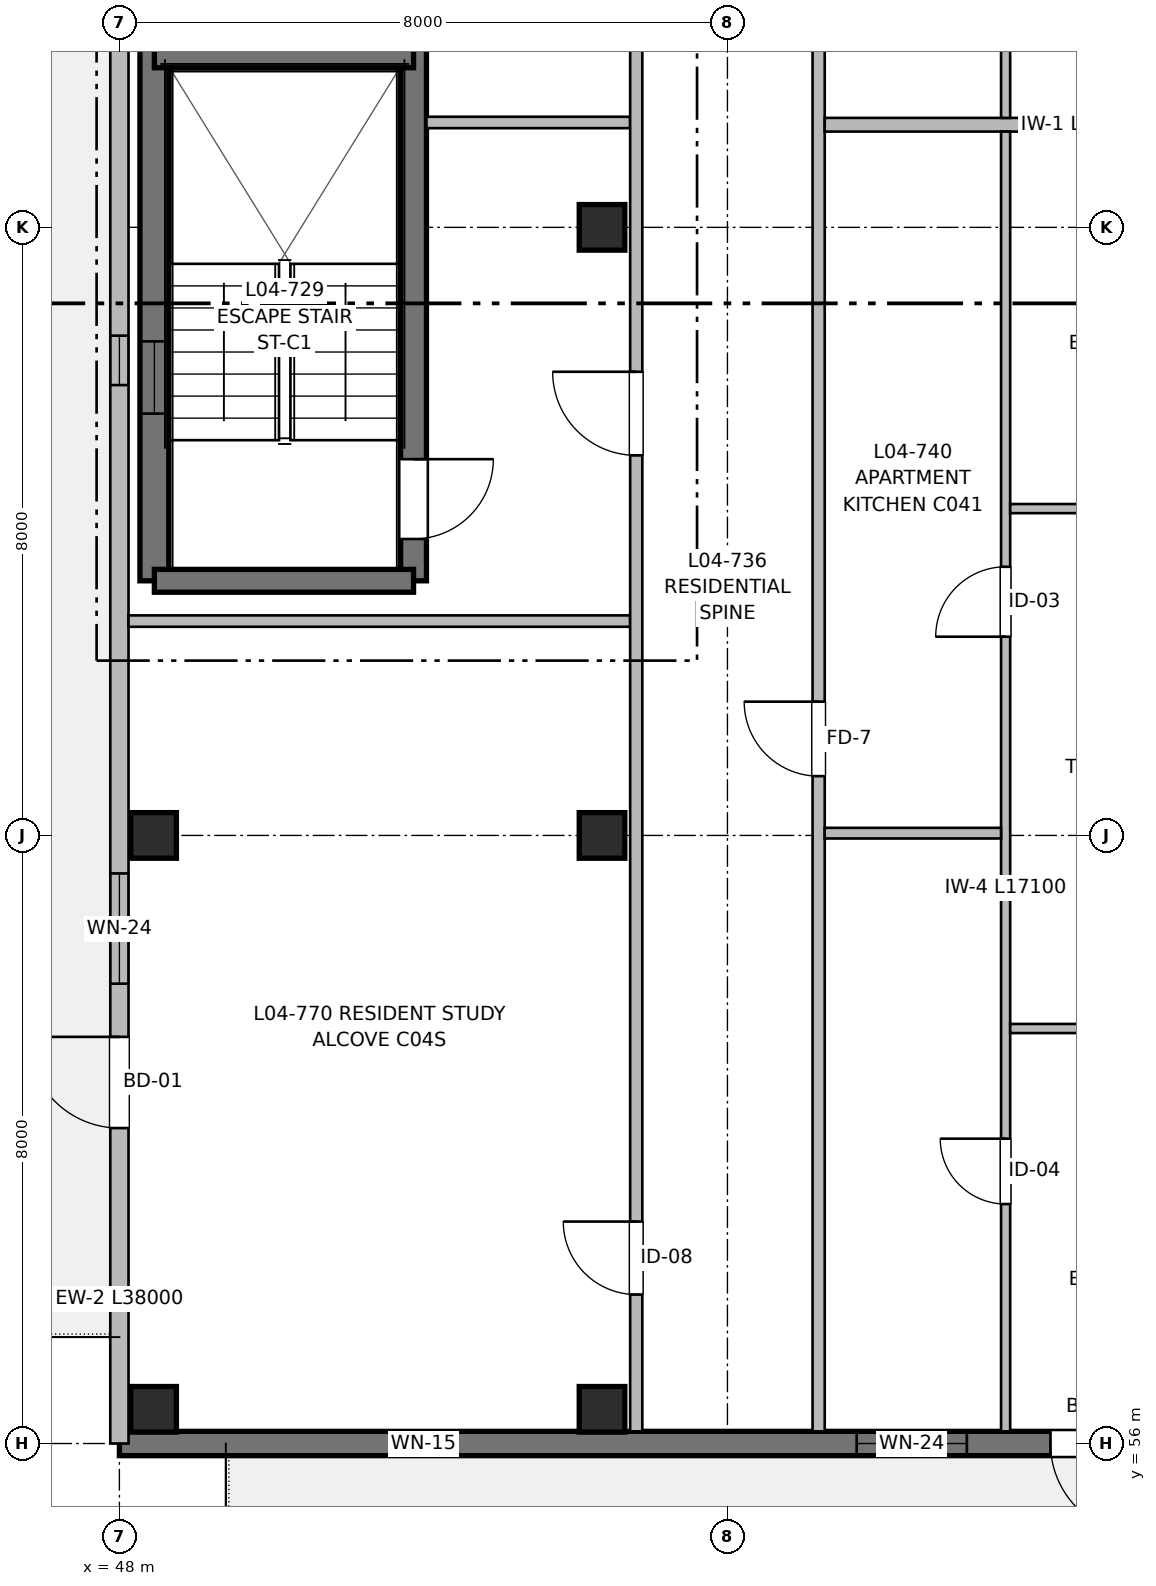
"""IFC4 building model, lengths in metres.
Left out: names, types, materials, properties, quantities, classifications, styles, units other than length and angle.
Written with IfcOpenShell. Run it as: python <this file> out.ifc"""

import sys

from ifc_helpers import new_model, si_unit, direction, frame, frame_2d, origin, origin_2d, place, context, subcontext, project, spatial, rectangle, extrude, element, fill, save


model = new_model("IFC4")
c1 = context("Model", 3, precision=1e-05, world=origin(), true_north=direction((0.0, 1.0)))
c2 = subcontext(c1, "Body", "Model", "MODEL_VIEW")
j1 = project(units=[si_unit("LENGTHUNIT", "METRE"), si_unit("PLANEANGLEUNIT", "RADIAN")], contexts=[c1])
p1 = place(None, origin())
s1 = spatial("IfcSite", under=j1, at=p1, CompositionType="ELEMENT")
p2 = place(p1, origin())
s2 = spatial("IfcBuilding", under=s1, at=p2, CompositionType="ELEMENT")
p3 = place(p2, frame((0.0, 0.0, 13.76)))
s3 = spatial("IfcBuildingStorey", under=s2, at=p3, CompositionType="ELEMENT", Elevation=13.76)
for number, where, z_axis, x_axis in (
    (1, (48.45, 56.45, 0.0), (0.0, 0.0, 1.0), (1.0, 0.0, 0.0)),
    (2, (48.45, 64.0, 0.0), (0.0, 0.0, 1.0), (1.0, 0.0, 0.0)),
    (3, (54.35, 56.45, 0.0), (0.0, 0.0, 1.0), (1.0, 0.0, 0.0)),
    (4, (54.35, 64.0, 0.0), (0.0, 0.0, 1.0), (1.0, 0.0, 0.0)),
    (5, (54.35, 72.0, 0.0), (0.0, 0.0, 1.0), (1.0, 0.0, 0.0)),
):
    element("IfcColumn", number, at=place(p3, frame(where, z_axis=z_axis, x_axis=x_axis)), inside=s3, PredefinedType="COLUMN", context=c2, shape_type="SweptSolid", body=[
        extrude(rectangle(XDim=0.6, YDim=0.6, at=origin_2d()), origin(), (0.0, 0.0, 1.0), 3.2),
    ])
p4 = place(p3, frame((48.46, 67.35, 0.0), z_axis=(0.0, 0.0, 1.0), x_axis=(0.0, 1.0, 0.0)))
e6 = element("IfcWall", 6, at=p4, inside=s3, PredefinedType="SHEAR", context=c2, shape_type="SweptSolid", body=[
    extrude(rectangle(XDim=12.45, YDim=0.38, at=frame_2d((6.225, 0.0))), origin(), (0.0, 0.0, 1.0), 3.2),
])
p5 = place(p4, frame((2.2, 0.0, 0.97)))
e7 = element("IfcOpeningElement", 7, at=p5, cuts=e6, PredefinedType="OPENING", context=c2, shape_type="SweptSolid", body=[
    extrude(rectangle(XDim=0.95, YDim=1.25, at=frame_2d((0.475, 0.625))), frame((0.0, 0.2, 0.0), z_axis=(0.0, -1.0, 0.0), x_axis=(1.0, 0.0, 0.0)), (0.0, 0.0, 1.0), 0.4),
])
p6 = place(p3, frame((51.87, 79.8, 0.0), z_axis=(0.0, 0.0, 1.0), x_axis=(0.0, -1.0, 0.0)))
e8 = element("IfcWall", 8, at=p6, inside=s3, PredefinedType="SHEAR", context=c2, shape_type="SweptSolid", body=[
    extrude(rectangle(XDim=12.45, YDim=0.34, at=frame_2d((6.225, 0.0))), origin(), (0.0, 0.0, 1.0), 3.2),
])
p7 = place(p6, frame((10.85, 0.0, 0.0)))
e9 = element("IfcOpeningElement", 9, at=p7, cuts=e8, PredefinedType="OPENING", context=c2, shape_type="SweptSolid", body=[
    extrude(rectangle(XDim=1.05, YDim=2.15, at=frame_2d((0.525, 1.075))), frame((0.0, 0.18, 0.0), z_axis=(0.0, -1.0, 0.0), x_axis=(1.0, 0.0, 0.0)), (0.0, 0.0, 1.0), 0.36),
])
p8 = place(p3, frame((51.87, 67.35, 0.0), z_axis=(0.0, 0.0, 1.0), x_axis=(-1.0, 0.0, 0.0)))
e10 = element("IfcWall", 10, at=p8, inside=s3, PredefinedType="SHEAR", context=c2, shape_type="SweptSolid", body=[
    extrude(rectangle(XDim=3.41, YDim=0.3, at=frame_2d((1.705, 0.0))), origin(), (0.0, 0.0, 1.0), 3.2),
])
p9 = place(p3, frame((48.46, 74.24, 0.0), z_axis=(0.0, 0.0, 1.0), x_axis=(1.0, 0.0, 0.0)))
e11 = element("IfcWall", 11, at=p9, inside=s3, PredefinedType="SHEAR", context=c2, shape_type="SweptSolid", body=[
    extrude(rectangle(XDim=3.41, YDim=0.28, at=frame_2d((1.705, 0.0))), origin(), (0.0, 0.0, 1.0), 3.2),
])
p10 = place(p3, frame((64.0, 56.0, 0.0), z_axis=(0.0, 0.0, 1.0), x_axis=(-1.0, 0.0, 0.0)))
e12 = element("IfcWall", 12, at=p10, inside=s3, PredefinedType="SHEAR", context=c2, shape_type="SweptSolid", body=[
    extrude(rectangle(XDim=16.0, YDim=0.32, at=frame_2d((8.0, 0.0))), origin(), (0.0, 0.0, 1.0), 2.98),
])
p11 = place(p10, frame((2.55, 0.0, 0.0)))
e13 = element("IfcOpeningElement", 13, at=p11, cuts=e12, PredefinedType="OPENING", context=c2, shape_type="SweptSolid", body=[
    extrude(rectangle(XDim=1.2, YDim=2.2, at=frame_2d((0.6, 1.1))), frame((0.0, 0.17, 0.0), z_axis=(0.0, -1.0, 0.0), x_axis=(1.0, 0.0, 0.0)), (0.0, 0.0, 1.0), 0.34),
])
p12 = place(p10, frame((4.85, 0.0, 0.77)))
e14 = element("IfcOpeningElement", 14, at=p12, cuts=e12, PredefinedType="OPENING", context=c2, shape_type="SweptSolid", body=[
    extrude(rectangle(XDim=1.45, YDim=1.45, at=frame_2d((0.725, 0.725))), frame((0.0, 0.17, 0.0), z_axis=(0.0, -1.0, 0.0), x_axis=(1.0, 0.0, 0.0)), (0.0, 0.0, 1.0), 0.34),
])
p13 = place(p10, frame((11.675, 0.0, 0.9)))
e15 = element("IfcOpeningElement", 15, at=p13, cuts=e12, PredefinedType="OPENING", context=c2, shape_type="SweptSolid", body=[
    extrude(rectangle(XDim=0.65, YDim=0.95, at=frame_2d((0.325, 0.475))), frame((0.0, 0.17, 0.0), z_axis=(0.0, -1.0, 0.0), x_axis=(1.0, 0.0, 0.0)), (0.0, 0.0, 1.0), 0.34),
])
p14 = place(p3, frame((48.0, 56.0, 0.0), z_axis=(0.0, 0.0, 1.0), x_axis=(0.0, 1.0, 0.0)))
e16 = element("IfcWall", 16, at=p14, inside=s3, PredefinedType="SOLIDWALL", context=c2, shape_type="SweptSolid", body=[
    extrude(rectangle(XDim=38.0, YDim=0.24, at=frame_2d((19.0, 0.0))), origin(), (0.0, 0.0, 1.0), 2.98),
])
p15 = place(p14, frame((4.15, 0.0, 0.0)))
e17 = element("IfcOpeningElement", 17, at=p15, cuts=e16, PredefinedType="OPENING", context=c2, shape_type="SweptSolid", body=[
    extrude(rectangle(XDim=1.2, YDim=2.2, at=frame_2d((0.6, 1.1))), frame((0.0, 0.13, 0.0), z_axis=(0.0, -1.0, 0.0), x_axis=(1.0, 0.0, 0.0)), (0.0, 0.0, 1.0), 0.26),
])
p16 = place(p14, frame((6.05, 0.0, 0.77)))
e18 = element("IfcOpeningElement", 18, at=p16, cuts=e16, PredefinedType="OPENING", context=c2, shape_type="SweptSolid", body=[
    extrude(rectangle(XDim=1.45, YDim=1.45, at=frame_2d((0.725, 0.725))), frame((0.0, 0.13, 0.0), z_axis=(0.0, -1.0, 0.0), x_axis=(1.0, 0.0, 0.0)), (0.0, 0.0, 1.0), 0.26),
])
p17 = place(p14, frame((13.925, 0.0, 0.9)))
e19 = element("IfcOpeningElement", 19, at=p17, cuts=e16, PredefinedType="OPENING", context=c2, shape_type="SweptSolid", body=[
    extrude(rectangle(XDim=0.65, YDim=0.95, at=frame_2d((0.325, 0.475))), frame((0.0, 0.13, 0.0), z_axis=(0.0, -1.0, 0.0), x_axis=(1.0, 0.0, 0.0)), (0.0, 0.0, 1.0), 0.26),
])
p18 = place(p14, frame((24.05, 0.0, 0.62)))
e20 = element("IfcOpeningElement", 20, at=p18, cuts=e16, PredefinedType="OPENING", context=c2, shape_type="SweptSolid", body=[
    extrude(rectangle(XDim=1.1, YDim=1.6, at=frame_2d((0.55, 0.8))), frame((0.0, 0.13, 0.0), z_axis=(0.0, -1.0, 0.0), x_axis=(1.0, 0.0, 0.0)), (0.0, 0.0, 1.0), 0.26),
])
p19 = place(p14, frame((31.9, 0.0, 0.47)))
e21 = element("IfcOpeningElement", 21, at=p19, cuts=e16, PredefinedType="OPENING", context=c2, shape_type="SweptSolid", body=[
    extrude(rectangle(XDim=2.7, YDim=1.75, at=frame_2d((1.35, 0.875))), frame((0.0, 0.13, 0.0), z_axis=(0.0, -1.0, 0.0), x_axis=(1.0, 0.0, 0.0)), (0.0, 0.0, 1.0), 0.26),
])
p20 = place(p3, frame((48.12, 66.82, 0.0), z_axis=(0.0, 0.0, 1.0), x_axis=(1.0, 0.0, 0.0)))
e22 = element("IfcWall", 22, at=p20, inside=s3, PredefinedType="PARTITIONING", context=c2, shape_type="SweptSolid", body=[
    extrude(rectangle(XDim=6.6, YDim=0.15, at=frame_2d((3.3, 0.0))), origin(), (0.0, 0.0, 1.0), 2.935),
])
p21 = place(p3, frame((52.04, 73.38, 0.0), z_axis=(0.0, 0.0, 1.0), x_axis=(1.0, 0.0, 0.0)))
e23 = element("IfcWall", 23, at=p21, inside=s3, PredefinedType="PARTITIONING", context=c2, shape_type="SweptSolid", body=[
    extrude(rectangle(XDim=2.68, YDim=0.15, at=frame_2d((1.34, 0.0))), origin(), (0.0, 0.0, 1.0), 2.935),
])
p22 = place(p3, frame((54.8, 56.16, 0.0), z_axis=(0.0, 0.0, 1.0), x_axis=(0.0, 1.0, 0.0)))
e24 = element("IfcWall", 24, at=p22, inside=s3, PredefinedType="PARTITIONING", context=c2, shape_type="SweptSolid", body=[
    extrude(rectangle(XDim=50.64, YDim=0.16, at=frame_2d((25.32, 0.0))), origin(), (0.0, 0.0, 1.0), 2.935),
])
p23 = place(p22, frame((12.84, 0.0, 0.0)))
e25 = element("IfcOpeningElement", 25, at=p23, cuts=e24, PredefinedType="OPENING", context=c2, shape_type="SweptSolid", body=[
    extrude(rectangle(XDim=1.1, YDim=2.15, at=frame_2d((0.55, 1.075))), frame((0.0, 0.09, 0.0), z_axis=(0.0, -1.0, 0.0), x_axis=(1.0, 0.0, 0.0)), (0.0, 0.0, 1.0), 0.18),
])
p24 = place(p22, frame((19.24, 0.0, 0.0)))
e26 = element("IfcOpeningElement", 26, at=p24, cuts=e24, PredefinedType="OPENING", context=c2, shape_type="SweptSolid", body=[
    extrude(rectangle(XDim=1.6, YDim=2.15, at=frame_2d((0.8, 1.075))), frame((0.0, 0.09, 0.0), z_axis=(0.0, -1.0, 0.0), x_axis=(1.0, 0.0, 0.0)), (0.0, 0.0, 1.0), 0.18),
])
p25 = place(p22, frame((1.8, 0.0, 0.0)))
e27 = element("IfcOpeningElement", 27, at=p25, cuts=e24, PredefinedType="OPENING", context=c2, shape_type="SweptSolid", body=[
    extrude(rectangle(XDim=0.96, YDim=2.15, at=frame_2d((0.48, 1.075))), frame((0.0, 0.09, 0.0), z_axis=(0.0, -1.0, 0.0), x_axis=(1.0, 0.0, 0.0)), (0.0, 0.0, 1.0), 0.18),
])
p26 = place(p22, frame((32.745, 0.0, 0.0)))
e28 = element("IfcOpeningElement", 28, at=p26, cuts=e24, PredefinedType="OPENING", context=c2, shape_type="SweptSolid", body=[
    extrude(rectangle(XDim=0.98, YDim=2.15, at=frame_2d((0.49, 1.075))), frame((0.0, 0.09, 0.0), z_axis=(0.0, -1.0, 0.0), x_axis=(1.0, 0.0, 0.0)), (0.0, 0.0, 1.0), 0.18),
])
p27 = place(p22, frame((40.955, 0.0, 0.0)))
e29 = element("IfcOpeningElement", 29, at=p27, cuts=e24, PredefinedType="OPENING", context=c2, shape_type="SweptSolid", body=[
    extrude(rectangle(XDim=0.98, YDim=2.15, at=frame_2d((0.49, 1.075))), frame((0.0, 0.09, 0.0), z_axis=(0.0, -1.0, 0.0), x_axis=(1.0, 0.0, 0.0)), (0.0, 0.0, 1.0), 0.18),
])
p28 = place(p3, frame((57.2, 56.16, 0.0), z_axis=(0.0, 0.0, 1.0), x_axis=(0.0, 1.0, 0.0)))
e30 = element("IfcWall", 30, at=p28, inside=s3, PredefinedType="PARTITIONING", context=c2, shape_type="SweptSolid", body=[
    extrude(rectangle(XDim=50.64, YDim=0.16, at=frame_2d((25.32, 0.0))), origin(), (0.0, 0.0, 1.0), 2.935),
])
p29 = place(p28, frame((8.62, 0.0, 0.0)))
e31 = element("IfcOpeningElement", 31, at=p29, cuts=e30, PredefinedType="OPENING", context=c2, shape_type="SweptSolid", body=[
    extrude(rectangle(XDim=0.98, YDim=2.15, at=frame_2d((0.49, 1.075))), frame((0.0, 0.09, 0.0), z_axis=(0.0, -1.0, 0.0), x_axis=(1.0, 0.0, 0.0)), (0.0, 0.0, 1.0), 0.18),
])
p30 = place(p28, frame((25.85, 0.0, 0.0)))
e32 = element("IfcOpeningElement", 32, at=p30, cuts=e30, PredefinedType="OPENING", context=c2, shape_type="SweptSolid", body=[
    extrude(rectangle(XDim=0.98, YDim=2.15, at=frame_2d((0.49, 1.075))), frame((0.0, 0.09, 0.0), z_axis=(0.0, -1.0, 0.0), x_axis=(1.0, 0.0, 0.0)), (0.0, 0.0, 1.0), 0.18),
])
p31 = place(p28, frame((42.62, 0.0, 0.0)))
e33 = element("IfcOpeningElement", 33, at=p31, cuts=e30, PredefinedType="OPENING", context=c2, shape_type="SweptSolid", body=[
    extrude(rectangle(XDim=0.98, YDim=2.15, at=frame_2d((0.49, 1.075))), frame((0.0, 0.09, 0.0), z_axis=(0.0, -1.0, 0.0), x_axis=(1.0, 0.0, 0.0)), (0.0, 0.0, 1.0), 0.18),
])
p32 = place(p3, frame((57.28, 73.35, 0.0), z_axis=(0.0, 0.0, 1.0), x_axis=(1.0, 0.0, 0.0)))
e34 = element("IfcWall", 34, at=p32, inside=s3, PredefinedType="PARTITIONING", context=c2, shape_type="SweptSolid", body=[
    extrude(rectangle(XDim=6.6, YDim=0.18, at=frame_2d((3.3, 0.0))), origin(), (0.0, 0.0, 1.0), 2.935),
])
p33 = place(p3, frame((59.66, 56.16, 0.0), z_axis=(0.0, 0.0, 1.0), x_axis=(0.0, 1.0, 0.0)))
e35 = element("IfcWall", 35, at=p33, inside=s3, PredefinedType="PARTITIONING", context=c2, shape_type="SweptSolid", body=[
    extrude(rectangle(XDim=17.1, YDim=0.12, at=frame_2d((8.55, 0.0))), origin(), (0.0, 0.0, 1.0), 2.935),
])
p34 = place(p33, frame((2.99, 0.0, 0.0)))
e36 = element("IfcOpeningElement", 36, at=p34, cuts=e35, PredefinedType="OPENING", context=c2, shape_type="SweptSolid", body=[
    extrude(rectangle(XDim=0.86, YDim=2.1, at=frame_2d((0.43, 1.05))), frame((0.0, 0.07, 0.0), z_axis=(0.0, -1.0, 0.0), x_axis=(1.0, 0.0, 0.0)), (0.0, 0.0, 1.0), 0.14),
])
p35 = place(p33, frame((10.454, 0.0, 0.0)))
e37 = element("IfcOpeningElement", 37, at=p35, cuts=e35, PredefinedType="OPENING", context=c2, shape_type="SweptSolid", body=[
    extrude(rectangle(XDim=0.92, YDim=2.1, at=frame_2d((0.46, 1.05))), frame((0.0, 0.07, 0.0), z_axis=(0.0, -1.0, 0.0), x_axis=(1.0, 0.0, 0.0)), (0.0, 0.0, 1.0), 0.14),
])
p36 = place(p3, frame((57.28, 64.03, 0.0), z_axis=(0.0, 0.0, 1.0), x_axis=(1.0, 0.0, 0.0)))
e38 = element("IfcWall", 38, at=p36, inside=s3, PredefinedType="PARTITIONING", context=c2, shape_type="SweptSolid", body=[
    extrude(rectangle(XDim=2.32, YDim=0.14, at=frame_2d((1.16, 0.0))), origin(), (0.0, 0.0, 1.0), 2.53),
])
p37 = place(p3, frame((59.72, 61.46, 0.0), z_axis=(0.0, 0.0, 1.0), x_axis=(1.0, 0.0, 0.0)))
e39 = element("IfcWall", 39, at=p37, inside=s3, PredefinedType="PARTITIONING", context=c2, shape_type="SweptSolid", body=[
    extrude(rectangle(XDim=4.16, YDim=0.12, at=frame_2d((2.08, 0.0))), origin(), (0.0, 0.0, 1.0), 2.935),
])
p38 = place(p37, frame((1.63, 0.0, 0.0)))
e40 = element("IfcOpeningElement", 40, at=p38, cuts=e39, PredefinedType="OPENING", context=c2, shape_type="SweptSolid", body=[
    extrude(rectangle(XDim=0.9, YDim=2.1, at=frame_2d((0.45, 1.05))), frame((0.0, 0.07, 0.0), z_axis=(0.0, -1.0, 0.0), x_axis=(1.0, 0.0, 0.0)), (0.0, 0.0, 1.0), 0.14),
])
p39 = place(p3, frame((59.72, 68.3, 0.0), z_axis=(0.0, 0.0, 1.0), x_axis=(1.0, 0.0, 0.0)))
e41 = element("IfcWall", 41, at=p39, inside=s3, PredefinedType="PARTITIONING", context=c2, shape_type="SweptSolid", body=[
    extrude(rectangle(XDim=4.16, YDim=0.12, at=frame_2d((2.08, 0.0))), origin(), (0.0, 0.0, 1.0), 2.935),
])
p40 = place(p39, frame((1.64, 0.0, 0.0)))
e42 = element("IfcOpeningElement", 42, at=p40, cuts=e41, PredefinedType="OPENING", context=c2, shape_type="SweptSolid", body=[
    extrude(rectangle(XDim=0.88, YDim=2.1, at=frame_2d((0.44, 1.05))), frame((0.0, 0.07, 0.0), z_axis=(0.0, -1.0, 0.0), x_axis=(1.0, 0.0, 0.0)), (0.0, 0.0, 1.0), 0.14),
])
p41 = place(p3, frame((59.66, 73.44, 0.0), z_axis=(0.0, 0.0, 1.0), x_axis=(0.0, 1.0, 0.0)))
e43 = element("IfcWall", 43, at=p41, inside=s3, PredefinedType="PARTITIONING", context=c2, shape_type="SweptSolid", body=[
    extrude(rectangle(XDim=17.01, YDim=0.12, at=frame_2d((8.505, 0.0))), origin(), (0.0, 0.0, 1.0), 2.935),
])
p42 = place(p41, frame((2.972, 0.0, 0.0)))
e44 = element("IfcOpeningElement", 44, at=p42, cuts=e43, PredefinedType="OPENING", context=c2, shape_type="SweptSolid", body=[
    extrude(rectangle(XDim=0.86, YDim=2.1, at=frame_2d((0.43, 1.05))), frame((0.0, 0.07, 0.0), z_axis=(0.0, -1.0, 0.0), x_axis=(1.0, 0.0, 0.0)), (0.0, 0.0, 1.0), 0.14),
])
p43 = place(p41, frame((10.393, 0.0, 0.0)))
e45 = element("IfcOpeningElement", 45, at=p43, cuts=e43, PredefinedType="OPENING", context=c2, shape_type="SweptSolid", body=[
    extrude(rectangle(XDim=0.92, YDim=2.1, at=frame_2d((0.46, 1.05))), frame((0.0, 0.07, 0.0), z_axis=(0.0, -1.0, 0.0), x_axis=(1.0, 0.0, 0.0)), (0.0, 0.0, 1.0), 0.14),
])
p44 = place(p7, origin())
e46 = element("IfcDoor", 46, at=p44, inside=s3, OperationType="SINGLE_SWING_LEFT", PredefinedType="DOOR", context=c2, shape_type="SweptSolid", body=[
    extrude(rectangle(XDim=1.05, YDim=2.15, at=frame_2d((0.525, 1.075))), frame((0.0, 0.025, 0.0), z_axis=(0.0, -1.0, 0.0), x_axis=(1.0, 0.0, 0.0)), (0.0, 0.0, 1.0), 0.05),
])
fill(e9, e46)
p45 = place(p5, origin())
e47 = element("IfcWindow", 47, at=p45, inside=s3, PartitioningType="SINGLE_PANEL", PredefinedType="WINDOW", context=c2, shape_type="SweptSolid", body=[
    extrude(rectangle(XDim=0.95, YDim=1.25, at=frame_2d((0.475, 0.625))), frame((0.0, 0.03, 0.0), z_axis=(0.0, -1.0, 0.0), x_axis=(1.0, 0.0, 0.0)), (0.0, 0.0, 1.0), 0.06),
])
fill(e7, e47)
p46 = place(p11, origin())
e48 = element("IfcDoor", 48, at=p46, inside=s3, OperationType="SINGLE_SWING_LEFT", PredefinedType="DOOR", context=c2, shape_type="SweptSolid", body=[
    extrude(rectangle(XDim=1.2, YDim=2.2, at=frame_2d((0.6, 1.1))), frame((0.0, 0.025, 0.0), z_axis=(0.0, -1.0, 0.0), x_axis=(1.0, 0.0, 0.0)), (0.0, 0.0, 1.0), 0.05),
])
fill(e13, e48)
p47 = place(p12, origin())
e49 = element("IfcWindow", 49, at=p47, inside=s3, PartitioningType="SINGLE_PANEL", PredefinedType="WINDOW", context=c2, shape_type="SweptSolid", body=[
    extrude(rectangle(XDim=1.45, YDim=1.45, at=frame_2d((0.725, 0.725))), frame((0.0, 0.03, 0.0), z_axis=(0.0, -1.0, 0.0), x_axis=(1.0, 0.0, 0.0)), (0.0, 0.0, 1.0), 0.06),
])
fill(e14, e49)
p48 = place(p13, origin())
e50 = element("IfcWindow", 50, at=p48, inside=s3, PartitioningType="SINGLE_PANEL", PredefinedType="WINDOW", context=c2, shape_type="SweptSolid", body=[
    extrude(rectangle(XDim=0.65, YDim=0.95, at=frame_2d((0.325, 0.475))), frame((0.0, 0.03, 0.0), z_axis=(0.0, -1.0, 0.0), x_axis=(1.0, 0.0, 0.0)), (0.0, 0.0, 1.0), 0.06),
])
fill(e15, e50)
p49 = place(p15, origin())
e51 = element("IfcDoor", 51, at=p49, inside=s3, OperationType="SINGLE_SWING_RIGHT", PredefinedType="DOOR", context=c2, shape_type="SweptSolid", body=[
    extrude(rectangle(XDim=1.2, YDim=2.2, at=frame_2d((0.6, 1.1))), frame((0.0, 0.025, 0.0), z_axis=(0.0, -1.0, 0.0), x_axis=(1.0, 0.0, 0.0)), (0.0, 0.0, 1.0), 0.05),
])
fill(e17, e51)
p50 = place(p16, origin())
e52 = element("IfcWindow", 52, at=p50, inside=s3, PartitioningType="SINGLE_PANEL", PredefinedType="WINDOW", context=c2, shape_type="SweptSolid", body=[
    extrude(rectangle(XDim=1.45, YDim=1.45, at=frame_2d((0.725, 0.725))), frame((0.0, 0.03, 0.0), z_axis=(0.0, -1.0, 0.0), x_axis=(1.0, 0.0, 0.0)), (0.0, 0.0, 1.0), 0.06),
])
fill(e18, e52)
p51 = place(p17, origin())
e53 = element("IfcWindow", 53, at=p51, inside=s3, PartitioningType="SINGLE_PANEL", PredefinedType="WINDOW", context=c2, shape_type="SweptSolid", body=[
    extrude(rectangle(XDim=0.65, YDim=0.95, at=frame_2d((0.325, 0.475))), frame((0.0, 0.03, 0.0), z_axis=(0.0, -1.0, 0.0), x_axis=(1.0, 0.0, 0.0)), (0.0, 0.0, 1.0), 0.06),
])
fill(e19, e53)
p52 = place(p23, origin())
e54 = element("IfcDoor", 54, at=p52, inside=s3, OperationType="SINGLE_SWING_RIGHT", PredefinedType="DOOR", context=c2, shape_type="SweptSolid", body=[
    extrude(rectangle(XDim=1.1, YDim=2.15, at=frame_2d((0.55, 1.075))), frame((0.0, 0.025, 0.0), z_axis=(0.0, -1.0, 0.0), x_axis=(1.0, 0.0, 0.0)), (0.0, 0.0, 1.0), 0.05),
])
fill(e25, e54)
p53 = place(p34, origin())
e55 = element("IfcDoor", 55, at=p53, inside=s3, OperationType="SINGLE_SWING_RIGHT", PredefinedType="DOOR", context=c2, shape_type="SweptSolid", body=[
    extrude(rectangle(XDim=0.86, YDim=2.1, at=frame_2d((0.43, 1.05))), frame((0.0, 0.025, 0.0), z_axis=(0.0, -1.0, 0.0), x_axis=(1.0, 0.0, 0.0)), (0.0, 0.0, 1.0), 0.05),
])
fill(e36, e55)
p54 = place(p35, origin())
e56 = element("IfcDoor", 56, at=p54, inside=s3, OperationType="SINGLE_SWING_LEFT", PredefinedType="DOOR", context=c2, shape_type="SweptSolid", body=[
    extrude(rectangle(XDim=0.92, YDim=2.1, at=frame_2d((0.46, 1.05))), frame((0.0, 0.025, 0.0), z_axis=(0.0, -1.0, 0.0), x_axis=(1.0, 0.0, 0.0)), (0.0, 0.0, 1.0), 0.05),
])
fill(e37, e56)
p55 = place(p29, origin())
e57 = element("IfcDoor", 57, at=p55, inside=s3, OperationType="SINGLE_SWING_RIGHT", PredefinedType="DOOR", context=c2, shape_type="SweptSolid", body=[
    extrude(rectangle(XDim=0.98, YDim=2.15, at=frame_2d((0.49, 1.075))), frame((0.0, 0.025, 0.0), z_axis=(0.0, -1.0, 0.0), x_axis=(1.0, 0.0, 0.0)), (0.0, 0.0, 1.0), 0.05),
])
fill(e31, e57)
p56 = place(p25, origin())
e58 = element("IfcDoor", 58, at=p56, inside=s3, OperationType="SINGLE_SWING_RIGHT", PredefinedType="DOOR", context=c2, shape_type="SweptSolid", body=[
    extrude(rectangle(XDim=0.96, YDim=2.15, at=frame_2d((0.48, 1.075))), frame((0.0, 0.025, 0.0), z_axis=(0.0, -1.0, 0.0), x_axis=(1.0, 0.0, 0.0)), (0.0, 0.0, 1.0), 0.05),
])
fill(e27, e58)
save(model, sys.argv[1])
